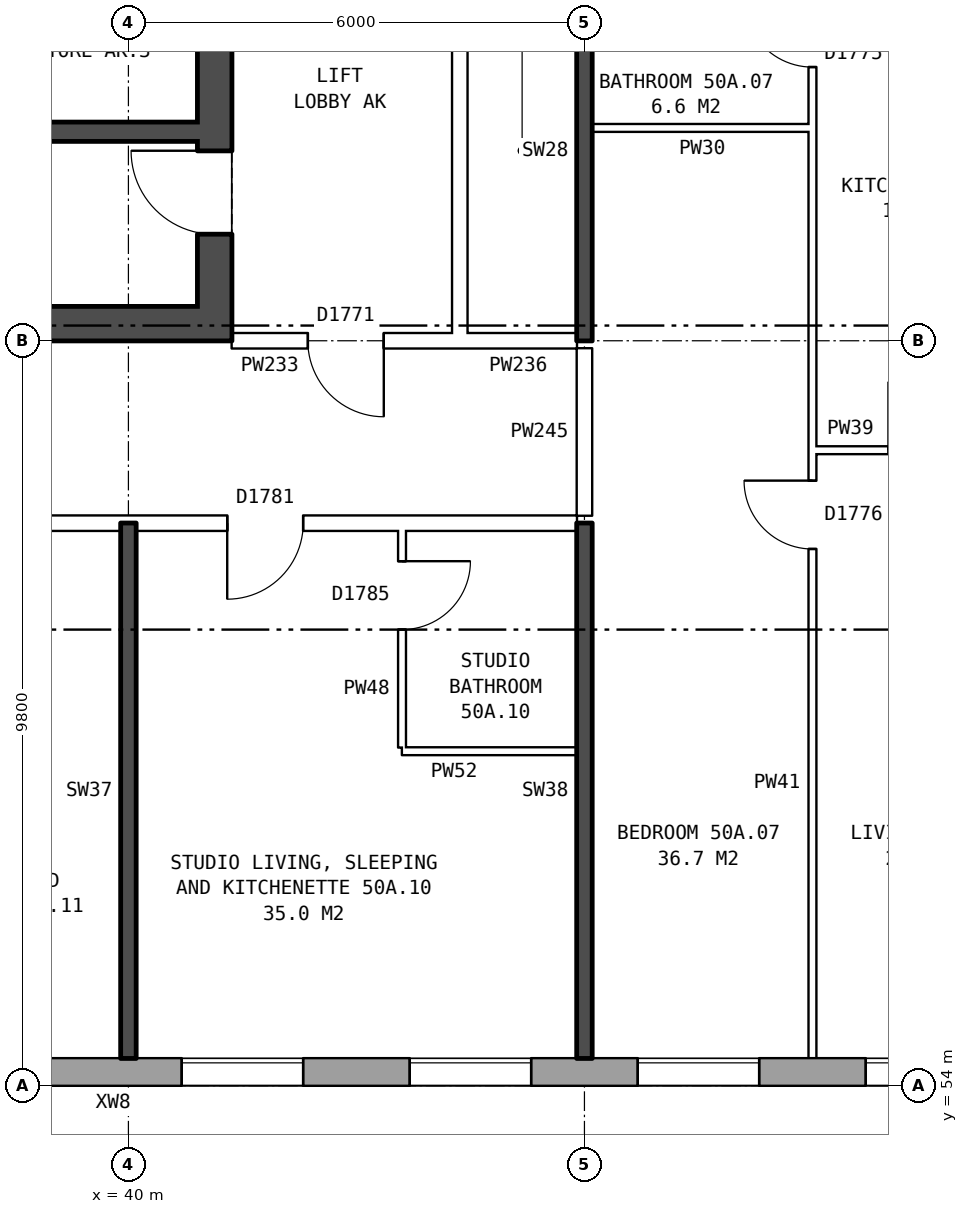
"""IFC4 building model, lengths in metres.
Left out: names, types, materials, properties, quantities, classifications, styles, units other than length and angle.
Written with IfcOpenShell. Run it as: python <this file> out.ifc"""

import sys

from ifc_helpers import new_model, si_unit, direction, frame, frame_2d, origin, place, context, subcontext, project, spatial, rectangle, extrude, element, fill, save


model = new_model("IFC4")
c1 = context("Model", 3, precision=1e-05, world=origin(), true_north=direction((0.0, 1.0)))
c2 = subcontext(c1, "Body", "Model", "MODEL_VIEW")
j1 = project(units=[si_unit("LENGTHUNIT", "METRE"), si_unit("PLANEANGLEUNIT", "RADIAN")], contexts=[c1])
p1 = place(None, origin())
s1 = spatial("IfcSite", under=j1, at=p1, CompositionType="ELEMENT")
p2 = place(p1, origin())
s2 = spatial("IfcBuilding", under=s1, at=p2, CompositionType="ELEMENT")
p3 = place(p2, frame((0.0, 0.0, 178.9)))
s3 = spatial("IfcBuildingStorey", under=s2, at=p3, CompositionType="ELEMENT", Elevation=178.9)
p4 = place(p3, frame((33.325, 54.18, 0.0), z_axis=(0.0, 0.0, 1.0), x_axis=(1.0, 0.0, 0.0)))
e1 = element("IfcWall", 1, at=p4, inside=s3, PredefinedType="STANDARD", context=c2, shape_type="SweptSolid", body=[
    extrude(rectangle(XDim=39.601, YDim=0.36, at=frame_2d((19.8, 0.0))), origin(), (0.0, 0.0, 1.0), 2.85),
])
p5 = place(p4, frame((1.375, 0.0, 0.8)))
e2 = element("IfcOpeningElement", 2, at=p5, cuts=e1, PredefinedType="OPENING", context=c2, shape_type="SweptSolid", body=[
    extrude(rectangle(XDim=1.6, YDim=1.8, at=frame_2d((0.8, 0.9))), frame((0.0, 0.19, 0.0), z_axis=(0.0, -1.0, 0.0), x_axis=(1.0, 0.0, 0.0)), (0.0, 0.0, 1.0), 0.38),
])
p6 = place(p4, frame((3.275, 0.0, 0.8)))
e3 = element("IfcOpeningElement", 3, at=p6, cuts=e1, PredefinedType="OPENING", context=c2, shape_type="SweptSolid", body=[
    extrude(rectangle(XDim=1.4, YDim=1.8, at=frame_2d((0.7, 0.9))), frame((0.0, 0.19, 0.0), z_axis=(0.0, -1.0, 0.0), x_axis=(1.0, 0.0, 0.0)), (0.0, 0.0, 1.0), 0.38),
])
p7 = place(p4, frame((7.375, 0.0, 0.8)))
e4 = element("IfcOpeningElement", 4, at=p7, cuts=e1, PredefinedType="OPENING", context=c2, shape_type="SweptSolid", body=[
    extrude(rectangle(XDim=1.6, YDim=1.8, at=frame_2d((0.8, 0.9))), frame((0.0, 0.19, 0.0), z_axis=(0.0, -1.0, 0.0), x_axis=(1.0, 0.0, 0.0)), (0.0, 0.0, 1.0), 0.38),
])
p8 = place(p4, frame((10.375, 0.0, 0.8)))
e5 = element("IfcOpeningElement", 5, at=p8, cuts=e1, PredefinedType="OPENING", context=c2, shape_type="SweptSolid", body=[
    extrude(rectangle(XDim=1.6, YDim=1.8, at=frame_2d((0.8, 0.9))), frame((0.0, 0.19, 0.0), z_axis=(0.0, -1.0, 0.0), x_axis=(1.0, 0.0, 0.0)), (0.0, 0.0, 1.0), 0.38),
])
p9 = place(p4, frame((13.375, 0.0, 0.8)))
e6 = element("IfcOpeningElement", 6, at=p9, cuts=e1, PredefinedType="OPENING", context=c2, shape_type="SweptSolid", body=[
    extrude(rectangle(XDim=1.6, YDim=1.8, at=frame_2d((0.8, 0.9))), frame((0.0, 0.19, 0.0), z_axis=(0.0, -1.0, 0.0), x_axis=(1.0, 0.0, 0.0)), (0.0, 0.0, 1.0), 0.38),
])
p10 = place(p4, frame((16.375, 0.0, 0.8)))
e7 = element("IfcOpeningElement", 7, at=p10, cuts=e1, PredefinedType="OPENING", context=c2, shape_type="SweptSolid", body=[
    extrude(rectangle(XDim=1.6, YDim=1.8, at=frame_2d((0.8, 0.9))), frame((0.0, 0.19, 0.0), z_axis=(0.0, -1.0, 0.0), x_axis=(1.0, 0.0, 0.0)), (0.0, 0.0, 1.0), 0.38),
])
p11 = place(p4, frame((19.375, 0.0, 0.8)))
e8 = element("IfcOpeningElement", 8, at=p11, cuts=e1, PredefinedType="OPENING", context=c2, shape_type="SweptSolid", body=[
    extrude(rectangle(XDim=1.6, YDim=1.8, at=frame_2d((0.8, 0.9))), frame((0.0, 0.19, 0.0), z_axis=(0.0, -1.0, 0.0), x_axis=(1.0, 0.0, 0.0)), (0.0, 0.0, 1.0), 0.38),
])
p12 = place(p4, frame((22.375, 0.0, 0.8)))
e9 = element("IfcOpeningElement", 9, at=p12, cuts=e1, PredefinedType="OPENING", context=c2, shape_type="SweptSolid", body=[
    extrude(rectangle(XDim=1.6, YDim=1.8, at=frame_2d((0.8, 0.9))), frame((0.0, 0.19, 0.0), z_axis=(0.0, -1.0, 0.0), x_axis=(1.0, 0.0, 0.0)), (0.0, 0.0, 1.0), 0.38),
])
p13 = place(p4, frame((25.375, 0.0, 0.8)))
e10 = element("IfcOpeningElement", 10, at=p13, cuts=e1, PredefinedType="OPENING", context=c2, shape_type="SweptSolid", body=[
    extrude(rectangle(XDim=1.6, YDim=1.8, at=frame_2d((0.8, 0.9))), frame((0.0, 0.19, 0.0), z_axis=(0.0, -1.0, 0.0), x_axis=(1.0, 0.0, 0.0)), (0.0, 0.0, 1.0), 0.38),
])
p14 = place(p4, frame((28.375, 0.0, 0.8)))
e11 = element("IfcOpeningElement", 11, at=p14, cuts=e1, PredefinedType="OPENING", context=c2, shape_type="SweptSolid", body=[
    extrude(rectangle(XDim=1.6, YDim=1.8, at=frame_2d((0.8, 0.9))), frame((0.0, 0.19, 0.0), z_axis=(0.0, -1.0, 0.0), x_axis=(1.0, 0.0, 0.0)), (0.0, 0.0, 1.0), 0.38),
])
p15 = place(p4, frame((30.875, 0.0, 0.8)))
e12 = element("IfcOpeningElement", 12, at=p15, cuts=e1, PredefinedType="OPENING", context=c2, shape_type="SweptSolid", body=[
    extrude(rectangle(XDim=1.0, YDim=1.8, at=frame_2d((0.5, 0.9))), frame((0.0, 0.19, 0.0), z_axis=(0.0, -1.0, 0.0), x_axis=(1.0, 0.0, 0.0)), (0.0, 0.0, 1.0), 0.38),
])
p16 = place(p4, frame((32.175, 0.0, 0.8)))
e13 = element("IfcOpeningElement", 13, at=p16, cuts=e1, PredefinedType="OPENING", context=c2, shape_type="SweptSolid", body=[
    extrude(rectangle(XDim=0.6, YDim=0.9, at=frame_2d((0.3, 0.45))), frame((0.0, 0.19, 0.0), z_axis=(0.0, -1.0, 0.0), x_axis=(1.0, 0.0, 0.0)), (0.0, 0.0, 1.0), 0.38),
])
p17 = place(p4, frame((37.375, 0.0, 0.8)))
e14 = element("IfcOpeningElement", 14, at=p17, cuts=e1, PredefinedType="OPENING", context=c2, shape_type="SweptSolid", body=[
    extrude(rectangle(XDim=1.6, YDim=1.8, at=frame_2d((0.8, 0.9))), frame((0.0, 0.19, 0.0), z_axis=(0.0, -1.0, 0.0), x_axis=(1.0, 0.0, 0.0)), (0.0, 0.0, 1.0), 0.38),
])
p18 = place(p4, frame((4.975, 0.0, 1.6)))
e15 = element("IfcOpeningElement", 15, at=p18, cuts=e1, PredefinedType="OPENING", context=c2, shape_type="SweptSolid", body=[
    extrude(rectangle(XDim=0.6, YDim=0.9, at=frame_2d((0.3, 0.45))), frame((0.0, 0.19, 0.0), z_axis=(0.0, -1.0, 0.0), x_axis=(1.0, 0.0, 0.0)), (0.0, 0.0, 1.0), 0.38),
])
p19 = place(p4, frame((33.925, 0.0, 1.7)))
e16 = element("IfcOpeningElement", 16, at=p19, cuts=e1, PredefinedType="OPENING", context=c2, shape_type="SweptSolid", body=[
    extrude(rectangle(XDim=0.6, YDim=0.9, at=frame_2d((0.3, 0.45))), frame((0.0, 0.19, 0.0), z_axis=(0.0, -1.0, 0.0), x_axis=(1.0, 0.0, 0.0)), (0.0, 0.0, 1.0), 0.38),
])
p20 = place(p4, frame((34.825, 0.0, 0.8)))
e17 = element("IfcOpeningElement", 17, at=p20, cuts=e1, PredefinedType="OPENING", context=c2, shape_type="SweptSolid", body=[
    extrude(rectangle(XDim=1.6, YDim=1.8, at=frame_2d((0.8, 0.9))), frame((0.0, 0.19, 0.0), z_axis=(0.0, -1.0, 0.0), x_axis=(1.0, 0.0, 0.0)), (0.0, 0.0, 1.0), 0.38),
])
p21 = place(p3, frame((41.135, 76.2, 0.0), z_axis=(0.0, 0.0, 1.0), x_axis=(0.0, -1.0, 0.0)))
e18 = element("IfcWall", 18, at=p21, inside=s3, PredefinedType="SHEAR", context=c2, shape_type="SweptSolid", body=[
    extrude(rectangle(XDim=12.4, YDim=0.45, at=frame_2d((6.2, 0.0))), origin(), (0.0, 0.0, 1.0), 2.85),
])
p22 = place(p21, frame((1.325, 0.0, 0.0)))
e19 = element("IfcOpeningElement", 19, at=p22, cuts=e18, PredefinedType="OPENING", context=c2, shape_type="SweptSolid", body=[
    extrude(rectangle(XDim=1.1, YDim=2.1, at=frame_2d((0.55, 1.05))), frame((0.0, 0.235, 0.0), z_axis=(0.0, -1.0, 0.0), x_axis=(1.0, 0.0, 0.0)), (0.0, 0.0, 1.0), 0.47),
])
p23 = place(p21, frame((4.225, 0.0, 0.0)))
e20 = element("IfcOpeningElement", 20, at=p23, cuts=e18, PredefinedType="OPENING", context=c2, shape_type="SweptSolid", body=[
    extrude(rectangle(XDim=0.85, YDim=2.1, at=frame_2d((0.425, 1.05))), frame((0.0, 0.235, 0.0), z_axis=(0.0, -1.0, 0.0), x_axis=(1.0, 0.0, 0.0)), (0.0, 0.0, 1.0), 0.47),
])
p24 = place(p21, frame((7.475, 0.0, 0.0)))
e21 = element("IfcOpeningElement", 21, at=p24, cuts=e18, PredefinedType="OPENING", context=c2, shape_type="SweptSolid", body=[
    extrude(rectangle(XDim=0.85, YDim=2.1, at=frame_2d((0.425, 1.05))), frame((0.0, 0.235, 0.0), z_axis=(0.0, -1.0, 0.0), x_axis=(1.0, 0.0, 0.0)), (0.0, 0.0, 1.0), 0.47),
])
p25 = place(p21, frame((9.9, 0.0, 0.0)))
e22 = element("IfcOpeningElement", 22, at=p25, cuts=e18, PredefinedType="OPENING", context=c2, shape_type="SweptSolid", body=[
    extrude(rectangle(XDim=1.1, YDim=2.1, at=frame_2d((0.55, 1.05))), frame((0.0, 0.235, 0.0), z_axis=(0.0, -1.0, 0.0), x_axis=(1.0, 0.0, 0.0)), (0.0, 0.0, 1.0), 0.47),
])
p26 = place(p3, frame((40.91, 64.025, 0.0), z_axis=(0.0, 0.0, 1.0), x_axis=(-1.0, 0.0, 0.0)))
e23 = element("IfcWall", 23, at=p26, inside=s3, PredefinedType="SHEAR", context=c2, shape_type="SweptSolid", body=[
    extrude(rectangle(XDim=8.1, YDim=0.45, at=frame_2d((4.05, 0.0))), origin(), (0.0, 0.0, 1.0), 2.85),
])
p27 = place(p3, frame((40.91, 66.55, 0.0), z_axis=(0.0, 0.0, 1.0), x_axis=(-1.0, 0.0, 0.0)))
e24 = element("IfcWall", 24, at=p27, inside=s3, PredefinedType="SHEAR", context=c2, shape_type="SweptSolid", body=[
    extrude(rectangle(XDim=2.475, YDim=0.25, at=frame_2d((1.237, 0.0))), origin(), (0.0, 0.0, 1.0), 2.85),
])
p28 = place(p3, frame((44.36, 63.9, 0.0), z_axis=(0.0, 0.0, 1.0), x_axis=(0.0, 1.0, 0.0)))
e25 = element("IfcWall", 25, at=p28, inside=s3, PredefinedType="PARTITIONING", context=c2, shape_type="SweptSolid", body=[
    extrude(rectangle(XDim=12.2, YDim=0.2, at=frame_2d((6.1, 0.0))), origin(), (0.0, 0.0, 1.0), 2.85),
])
p29 = place(p28, frame((5.1, 0.0, 0.0)))
e26 = element("IfcOpeningElement", 26, at=p29, cuts=e25, PredefinedType="OPENING", context=c2, shape_type="SweptSolid", body=[
    extrude(rectangle(XDim=2.0, YDim=2.1, at=frame_2d((1.0, 1.05))), frame((0.0, 0.11, 0.0), z_axis=(0.0, -1.0, 0.0), x_axis=(1.0, 0.0, 0.0)), (0.0, 0.0, 1.0), 0.22),
])
p30 = place(p3, frame((43.6, 58.4, 0.0), z_axis=(0.0, 0.0, 1.0), x_axis=(1.0, 0.0, 0.0)))
e27 = element("IfcWall", 27, at=p30, inside=s3, PredefinedType="PARTITIONING", context=c2, shape_type="SweptSolid", body=[
    extrude(rectangle(XDim=2.3, YDim=0.1, at=frame_2d((1.15, 0.0))), origin(), (0.0, 0.0, 1.0), 2.85),
])
p31 = place(p3, frame((30.61, 61.4, 0.0), z_axis=(0.0, 0.0, 1.0), x_axis=(1.0, 0.0, 0.0)))
e28 = element("IfcWall", 28, at=p31, inside=s3, PredefinedType="PARTITIONING", context=c2, shape_type="SweptSolid", body=[
    extrude(rectangle(XDim=15.29, YDim=0.2, at=frame_2d((7.645, 0.0))), origin(), (0.0, 0.0, 1.0), 2.85),
])
p32 = place(p31, frame((10.69, 0.0, 0.0)))
e29 = element("IfcOpeningElement", 29, at=p32, cuts=e28, PredefinedType="OPENING", context=c2, shape_type="SweptSolid", body=[
    extrude(rectangle(XDim=1.0, YDim=2.1, at=frame_2d((0.5, 1.05))), frame((0.0, 0.11, 0.0), z_axis=(0.0, -1.0, 0.0), x_axis=(1.0, 0.0, 0.0)), (0.0, 0.0, 1.0), 0.22),
])
p33 = place(p31, frame((5.89, 0.0, 0.0)))
e30 = element("IfcOpeningElement", 30, at=p33, cuts=e28, PredefinedType="OPENING", context=c2, shape_type="SweptSolid", body=[
    extrude(rectangle(XDim=1.0, YDim=2.1, at=frame_2d((0.5, 1.05))), frame((0.0, 0.11, 0.0), z_axis=(0.0, -1.0, 0.0), x_axis=(1.0, 0.0, 0.0)), (0.0, 0.0, 1.0), 0.22),
])
p34 = place(p3, frame((49.0, 62.36, 0.0), z_axis=(0.0, 0.0, 1.0), x_axis=(1.0, 0.0, 0.0)))
e31 = element("IfcWall", 31, at=p34, inside=s3, PredefinedType="PARTITIONING", context=c2, shape_type="SweptSolid", body=[
    extrude(rectangle(XDim=2.9, YDim=0.1, at=frame_2d((1.45, 0.0))), origin(), (0.0, 0.0, 1.0), 2.85),
])
p35 = place(p34, frame((1.0, 0.0, 0.0)))
e32 = element("IfcOpeningElement", 32, at=p35, cuts=e31, PredefinedType="OPENING", context=c2, shape_type="SweptSolid", body=[
    extrude(rectangle(XDim=0.9, YDim=2.1, at=frame_2d((0.45, 1.05))), frame((0.0, 0.06, 0.0), z_axis=(0.0, -1.0, 0.0), x_axis=(1.0, 0.0, 0.0)), (0.0, 0.0, 1.0), 0.12),
])
p36 = place(p3, frame((41.36, 63.8, 0.0), z_axis=(0.0, 0.0, 1.0), x_axis=(1.0, 0.0, 0.0)))
e33 = element("IfcWall", 33, at=p36, inside=s3, PredefinedType="PARTITIONING", context=c2, shape_type="SweptSolid", body=[
    extrude(rectangle(XDim=3.0, YDim=0.2, at=frame_2d((1.5, 0.0))), origin(), (0.0, 0.0, 1.0), 2.85),
])
p37 = place(p36, frame((1.0, 0.0, 0.0)))
e34 = element("IfcOpeningElement", 34, at=p37, cuts=e33, PredefinedType="OPENING", context=c2, shape_type="SweptSolid", body=[
    extrude(rectangle(XDim=1.0, YDim=2.1, at=frame_2d((0.5, 1.05))), frame((0.0, 0.11, 0.0), z_axis=(0.0, -1.0, 0.0), x_axis=(1.0, 0.0, 0.0)), (0.0, 0.0, 1.0), 0.22),
])
p38 = place(p3, frame((44.36, 63.8, 0.0), z_axis=(0.0, 0.0, 1.0), x_axis=(1.0, 0.0, 0.0)))
e35 = element("IfcWall", 35, at=p38, inside=s3, PredefinedType="PARTITIONING", context=c2, shape_type="SweptSolid", body=[
    extrude(rectangle(XDim=1.54, YDim=0.2, at=frame_2d((0.77, 0.0))), origin(), (0.0, 0.0, 1.0), 2.85),
])
p39 = place(p3, frame((46.1, 66.6, 0.0), z_axis=(0.0, 0.0, 1.0), x_axis=(1.0, 0.0, 0.0)))
e36 = element("IfcWall", 36, at=p39, inside=s3, PredefinedType="PARTITIONING", context=c2, shape_type="SweptSolid", body=[
    extrude(rectangle(XDim=2.9, YDim=0.1, at=frame_2d((1.45, 0.0))), origin(), (0.0, 0.0, 1.0), 2.85),
])
p40 = place(p3, frame((40.0, 54.36, 0.0), z_axis=(0.0, 0.0, 1.0), x_axis=(0.0, 1.0, 0.0)))
e37 = element("IfcWall", 37, at=p40, inside=s3, PredefinedType="SOLIDWALL", context=c2, shape_type="SweptSolid", body=[
    extrude(rectangle(XDim=7.04, YDim=0.2, at=frame_2d((3.52, 0.0))), origin(), (0.0, 0.0, 1.0), 2.85),
])
p41 = place(p3, frame((43.6, 58.45, 0.0), z_axis=(0.0, 0.0, 1.0), x_axis=(0.0, 1.0, 0.0)))
e38 = element("IfcWall", 38, at=p41, inside=s3, PredefinedType="PARTITIONING", context=c2, shape_type="SweptSolid", body=[
    extrude(rectangle(XDim=2.85, YDim=0.1, at=frame_2d((1.425, 0.0))), origin(), (0.0, 0.0, 1.0), 2.85),
])
p42 = place(p41, frame((1.55, 0.0, 0.0)))
e39 = element("IfcOpeningElement", 39, at=p42, cuts=e38, PredefinedType="OPENING", context=c2, shape_type="SweptSolid", body=[
    extrude(rectangle(XDim=0.9, YDim=2.1, at=frame_2d((0.45, 1.05))), frame((0.0, 0.06, 0.0), z_axis=(0.0, -1.0, 0.0), x_axis=(1.0, 0.0, 0.0)), (0.0, 0.0, 1.0), 0.12),
])
p43 = place(p3, frame((46.0, 54.36, 0.0), z_axis=(0.0, 0.0, 1.0), x_axis=(0.0, 1.0, 0.0)))
e40 = element("IfcWall", 40, at=p43, inside=s3, PredefinedType="SOLIDWALL", context=c2, shape_type="SweptSolid", body=[
    extrude(rectangle(XDim=7.04, YDim=0.2, at=frame_2d((3.52, 0.0))), origin(), (0.0, 0.0, 1.0), 2.85),
])
p44 = place(p3, frame((46.0, 61.5, 0.0), z_axis=(0.0, 0.0, 1.0), x_axis=(0.0, 1.0, 0.0)))
e41 = element("IfcWall", 41, at=p44, inside=s3, PredefinedType="PARTITIONING", context=c2, shape_type="SweptSolid", body=[
    extrude(rectangle(XDim=2.2, YDim=0.2, at=frame_2d((1.1, 0.0))), origin(), (0.0, 0.0, 1.0), 2.85),
])
p45 = place(p3, frame((46.0, 63.8, 0.0), z_axis=(0.0, 0.0, 1.0), x_axis=(0.0, 1.0, 0.0)))
e42 = element("IfcWall", 42, at=p45, inside=s3, PredefinedType="SOLIDWALL", context=c2, shape_type="SweptSolid", body=[
    extrude(rectangle(XDim=5.0, YDim=0.2, at=frame_2d((2.5, 0.0))), origin(), (0.0, 0.0, 1.0), 2.85),
])
p46 = place(p3, frame((49.0, 54.36, 0.0), z_axis=(0.0, 0.0, 1.0), x_axis=(0.0, 1.0, 0.0)))
e43 = element("IfcWall", 43, at=p46, inside=s3, PredefinedType="PARTITIONING", context=c2, shape_type="SweptSolid", body=[
    extrude(rectangle(XDim=14.34, YDim=0.1, at=frame_2d((7.17, 0.0))), origin(), (0.0, 0.0, 1.0), 2.85),
])
p47 = place(p46, frame((6.7, 0.0, 0.0)))
e44 = element("IfcOpeningElement", 44, at=p47, cuts=e43, PredefinedType="OPENING", context=c2, shape_type="SweptSolid", body=[
    extrude(rectangle(XDim=0.9, YDim=2.1, at=frame_2d((0.45, 1.05))), frame((0.0, 0.06, 0.0), z_axis=(0.0, -1.0, 0.0), x_axis=(1.0, 0.0, 0.0)), (0.0, 0.0, 1.0), 0.12),
])
p48 = place(p46, frame((13.04, 0.0, 0.0)))
e45 = element("IfcOpeningElement", 45, at=p48, cuts=e43, PredefinedType="OPENING", context=c2, shape_type="SweptSolid", body=[
    extrude(rectangle(XDim=0.9, YDim=2.1, at=frame_2d((0.45, 1.05))), frame((0.0, 0.06, 0.0), z_axis=(0.0, -1.0, 0.0), x_axis=(1.0, 0.0, 0.0)), (0.0, 0.0, 1.0), 0.12),
])
p49 = place(p7, origin())
e46 = element("IfcWindow", 46, at=p49, inside=s3, PartitioningType="SINGLE_PANEL", PredefinedType="WINDOW", context=c2, shape_type="SweptSolid", body=[
    extrude(rectangle(XDim=1.6, YDim=1.8, at=frame_2d((0.8, 0.9))), frame((0.0, 0.15, 0.0), z_axis=(0.0, -1.0, 0.0), x_axis=(1.0, 0.0, 0.0)), (0.0, 0.0, 1.0), 0.06),
])
fill(e4, e46)
p50 = place(p8, origin())
e47 = element("IfcWindow", 47, at=p50, inside=s3, PartitioningType="SINGLE_PANEL", PredefinedType="WINDOW", context=c2, shape_type="SweptSolid", body=[
    extrude(rectangle(XDim=1.6, YDim=1.8, at=frame_2d((0.8, 0.9))), frame((0.0, 0.15, 0.0), z_axis=(0.0, -1.0, 0.0), x_axis=(1.0, 0.0, 0.0)), (0.0, 0.0, 1.0), 0.06),
])
fill(e5, e47)
p51 = place(p9, origin())
e48 = element("IfcWindow", 48, at=p51, inside=s3, PartitioningType="SINGLE_PANEL", PredefinedType="WINDOW", context=c2, shape_type="SweptSolid", body=[
    extrude(rectangle(XDim=1.6, YDim=1.8, at=frame_2d((0.8, 0.9))), frame((0.0, 0.15, 0.0), z_axis=(0.0, -1.0, 0.0), x_axis=(1.0, 0.0, 0.0)), (0.0, 0.0, 1.0), 0.06),
])
fill(e6, e48)
p52 = place(p10, origin())
e49 = element("IfcWindow", 49, at=p52, inside=s3, PartitioningType="SINGLE_PANEL", PredefinedType="WINDOW", context=c2, shape_type="SweptSolid", body=[
    extrude(rectangle(XDim=1.6, YDim=1.8, at=frame_2d((0.8, 0.9))), frame((0.0, 0.15, 0.0), z_axis=(0.0, -1.0, 0.0), x_axis=(1.0, 0.0, 0.0)), (0.0, 0.0, 1.0), 0.06),
])
fill(e7, e49)
p53 = place(p25, frame((1.1, 0.0, 0.0), z_axis=(0.0, 0.0, 1.0), x_axis=(-1.0, 0.0, 0.0)))
e50 = element("IfcDoor", 50, at=p53, inside=s3, OperationType="SINGLE_SWING_RIGHT", PredefinedType="DOOR", context=c2, shape_type="SweptSolid", body=[
    extrude(rectangle(XDim=1.1, YDim=2.1, at=frame_2d((0.55, 1.05))), frame((0.0, 0.21, 0.0), z_axis=(0.0, -1.0, 0.0), x_axis=(1.0, 0.0, 0.0)), (0.0, 0.0, 1.0), 0.05),
])
fill(e22, e50)
p54 = place(p37, frame((1.0, 0.0, 0.0), z_axis=(0.0, 0.0, 1.0), x_axis=(-1.0, 0.0, 0.0)))
e51 = element("IfcDoor", 51, at=p54, inside=s3, OperationType="SINGLE_SWING_LEFT", PredefinedType="DOOR", context=c2, shape_type="SweptSolid", body=[
    extrude(rectangle(XDim=1.0, YDim=2.1, at=frame_2d((0.5, 1.05))), frame((0.0, 0.025, 0.0), z_axis=(0.0, -1.0, 0.0), x_axis=(1.0, 0.0, 0.0)), (0.0, 0.0, 1.0), 0.05),
])
fill(e34, e51)
p55 = place(p47, origin())
e52 = element("IfcDoor", 52, at=p55, inside=s3, OperationType="SINGLE_SWING_RIGHT", PredefinedType="DOOR", context=c2, shape_type="SweptSolid", body=[
    extrude(rectangle(XDim=0.9, YDim=2.1, at=frame_2d((0.45, 1.05))), frame((0.0, 0.025, 0.0), z_axis=(0.0, -1.0, 0.0), x_axis=(1.0, 0.0, 0.0)), (0.0, 0.0, 1.0), 0.05),
])
fill(e44, e52)
p56 = place(p48, origin())
e53 = element("IfcDoor", 53, at=p56, inside=s3, OperationType="SINGLE_SWING_RIGHT", PredefinedType="DOOR", context=c2, shape_type="SweptSolid", body=[
    extrude(rectangle(XDim=0.9, YDim=2.1, at=frame_2d((0.45, 1.05))), frame((0.0, 0.025, 0.0), z_axis=(0.0, -1.0, 0.0), x_axis=(1.0, 0.0, 0.0)), (0.0, 0.0, 1.0), 0.05),
])
fill(e45, e53)
p57 = place(p32, frame((1.0, 0.0, 0.0), z_axis=(0.0, 0.0, 1.0), x_axis=(-1.0, 0.0, 0.0)))
e54 = element("IfcDoor", 54, at=p57, inside=s3, OperationType="SINGLE_SWING_RIGHT", PredefinedType="DOOR", context=c2, shape_type="SweptSolid", body=[
    extrude(rectangle(XDim=1.0, YDim=2.1, at=frame_2d((0.5, 1.05))), frame((0.0, 0.025, 0.0), z_axis=(0.0, -1.0, 0.0), x_axis=(1.0, 0.0, 0.0)), (0.0, 0.0, 1.0), 0.05),
])
fill(e29, e54)
p58 = place(p42, frame((0.9, 0.0, 0.0), z_axis=(0.0, 0.0, 1.0), x_axis=(-1.0, 0.0, 0.0)))
e55 = element("IfcDoor", 55, at=p58, inside=s3, OperationType="SINGLE_SWING_LEFT", PredefinedType="DOOR", context=c2, shape_type="SweptSolid", body=[
    extrude(rectangle(XDim=0.9, YDim=2.1, at=frame_2d((0.45, 1.05))), frame((0.0, 0.025, 0.0), z_axis=(0.0, -1.0, 0.0), x_axis=(1.0, 0.0, 0.0)), (0.0, 0.0, 1.0), 0.05),
])
fill(e39, e55)
save(model, sys.argv[1])
